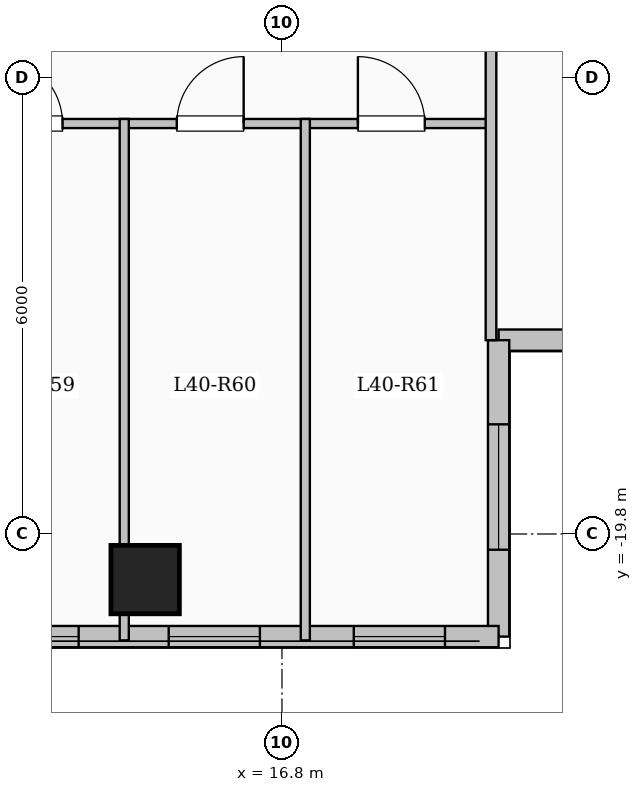
"""IFC4 building model, lengths in metres.
Left out: names, types, materials, properties, quantities, classifications, styles, units other than length and angle.
Written with IfcOpenShell. Run it as: python <this file> out.ifc"""

import sys

from ifc_helpers import new_model, si_unit, direction, frame, frame_2d, origin, origin_2d, place, context, subcontext, project, spatial, rectangle, extrude, element, fill, save


model = new_model("IFC4")
c1 = context("Model", 3, precision=1e-05, world=origin(), true_north=direction((0.0, 1.0)))
c2 = subcontext(c1, "Body", "Model", "MODEL_VIEW")
j1 = project(units=[si_unit("LENGTHUNIT", "METRE"), si_unit("PLANEANGLEUNIT", "RADIAN")], contexts=[c1])
p1 = place(None, origin())
s1 = spatial("IfcSite", under=j1, at=p1, CompositionType="ELEMENT")
p2 = place(p1, origin())
s2 = spatial("IfcBuilding", under=s1, at=p2, CompositionType="ELEMENT")
p3 = place(p2, frame((0.0, 0.0, 149.35)))
s3 = spatial("IfcBuildingStorey", under=s2, at=p3, CompositionType="ELEMENT", Elevation=149.35)
p4 = place(p3, frame((15.0, -20.4, 0.0), z_axis=(0.0, 0.0, 1.0), x_axis=(1.0, 0.0, 0.0)))
e1 = element("IfcColumn", 1, at=p4, inside=s3, PredefinedType="COLUMN", context=c2, shape_type="SweptSolid", body=[
    extrude(rectangle(XDim=0.9, YDim=0.9, at=origin_2d()), origin(), (0.0, 0.0, 1.0), 3.35),
])
p5 = place(p3, frame((25.05, -17.25, 0.0), z_axis=(0.0, 0.0, 1.0), x_axis=(-1.0, 0.0, 0.0)))
e2 = element("IfcWall", 2, at=p5, inside=s3, PredefinedType="SOLIDWALL", context=c2, shape_type="SweptSolid", body=[
    extrude(rectangle(XDim=5.4, YDim=0.28, at=frame_2d((2.7, 0.0))), origin(), (0.0, 0.0, 1.0), 3.1),
])
p6 = place(p5, frame((1.625, 0.0, 0.9)))
e3 = element("IfcOpeningElement", 3, at=p6, cuts=e2, PredefinedType="OPENING", context=c2, shape_type="SweptSolid", body=[
    extrude(rectangle(XDim=2.2, YDim=1.75, at=frame_2d((1.1, 0.875))), frame((0.0, 0.15, 0.0), z_axis=(0.0, -1.0, 0.0), x_axis=(1.0, 0.0, 0.0)), (0.0, 0.0, 1.0), 0.3),
])
p7 = place(p3, frame((19.65, -17.25, 0.0), z_axis=(0.0, 0.0, 1.0), x_axis=(0.0, -1.0, 0.0)))
e4 = element("IfcWall", 4, at=p7, inside=s3, PredefinedType="SOLIDWALL", context=c2, shape_type="SweptSolid", body=[
    extrude(rectangle(XDim=3.9, YDim=0.28, at=frame_2d((1.95, 0.0))), origin(), (0.0, 0.0, 1.0), 3.1),
])
p8 = place(p7, frame((1.107, 0.0, 0.9)))
e5 = element("IfcOpeningElement", 5, at=p8, cuts=e4, PredefinedType="OPENING", context=c2, shape_type="SweptSolid", body=[
    extrude(rectangle(XDim=1.65, YDim=1.6, at=frame_2d((0.825, 0.8))), frame((0.0, 0.15, 0.0), z_axis=(0.0, -1.0, 0.0), x_axis=(1.0, 0.0, 0.0)), (0.0, 0.0, 1.0), 0.3),
])
p9 = place(p3, frame((19.65, -21.15, 0.0), z_axis=(0.0, 0.0, 1.0), x_axis=(-1.0, 0.0, 0.0)))
e6 = element("IfcWall", 6, at=p9, inside=s3, PredefinedType="SOLIDWALL", context=c2, shape_type="SweptSolid", body=[
    extrude(rectangle(XDim=12.3, YDim=0.28, at=frame_2d((6.15, 0.0))), origin(), (0.0, 0.0, 1.0), 3.1),
])
p10 = place(p9, frame((0.705, 0.0, 0.95)))
e7 = element("IfcOpeningElement", 7, at=p10, cuts=e6, PredefinedType="OPENING", context=c2, shape_type="SweptSolid", body=[
    extrude(rectangle(XDim=1.2, YDim=1.5, at=frame_2d((0.6, 0.75))), frame((0.0, 0.15, 0.0), z_axis=(0.0, -1.0, 0.0), x_axis=(1.0, 0.0, 0.0)), (0.0, 0.0, 1.0), 0.3),
])
p11 = place(p9, frame((3.14, 0.0, 0.95)))
e8 = element("IfcOpeningElement", 8, at=p11, cuts=e6, PredefinedType="OPENING", context=c2, shape_type="SweptSolid", body=[
    extrude(rectangle(XDim=1.2, YDim=1.5, at=frame_2d((0.6, 0.75))), frame((0.0, 0.15, 0.0), z_axis=(0.0, -1.0, 0.0), x_axis=(1.0, 0.0, 0.0)), (0.0, 0.0, 1.0), 0.3),
])
p12 = place(p9, frame((5.525, 0.0, 0.95)))
e9 = element("IfcOpeningElement", 9, at=p12, cuts=e6, PredefinedType="OPENING", context=c2, shape_type="SweptSolid", body=[
    extrude(rectangle(XDim=1.2, YDim=1.5, at=frame_2d((0.6, 0.75))), frame((0.0, 0.15, 0.0), z_axis=(0.0, -1.0, 0.0), x_axis=(1.0, 0.0, 0.0)), (0.0, 0.0, 1.0), 0.3),
])
p13 = place(p9, frame((8.362, 0.0, 0.9)))
e10 = element("IfcOpeningElement", 10, at=p13, cuts=e6, PredefinedType="OPENING", context=c2, shape_type="SweptSolid", body=[
    extrude(rectangle(XDim=1.65, YDim=1.6, at=frame_2d((0.825, 0.8))), frame((0.0, 0.15, 0.0), z_axis=(0.0, -1.0, 0.0), x_axis=(1.0, 0.0, 0.0)), (0.0, 0.0, 1.0), 0.3),
])
p14 = place(p9, frame((11.303, 0.0, 0.95)))
e11 = element("IfcOpeningElement", 11, at=p14, cuts=e6, PredefinedType="OPENING", context=c2, shape_type="SweptSolid", body=[
    extrude(rectangle(XDim=0.85, YDim=1.5, at=frame_2d((0.425, 0.75))), frame((0.0, 0.15, 0.0), z_axis=(0.0, -1.0, 0.0), x_axis=(1.0, 0.0, 0.0)), (0.0, 0.0, 1.0), 0.3),
])
p15 = place(p3, frame((12.282, -14.4, 0.0), z_axis=(0.0, 0.0, 1.0), x_axis=(1.0, 0.0, 0.0)))
e12 = element("IfcWall", 12, at=p15, inside=s3, PredefinedType="PARTITIONING", context=c2, shape_type="SweptSolid", body=[
    extrude(rectangle(XDim=7.328, YDim=0.12, at=frame_2d((3.664, 0.0))), origin(), (0.0, 0.0, 1.0), 3.1),
])
p16 = place(p15, frame((0.751, 0.0, 0.0)))
e13 = element("IfcOpeningElement", 13, at=p16, cuts=e12, PredefinedType="OPENING", context=c2, shape_type="SweptSolid", body=[
    extrude(rectangle(XDim=0.88, YDim=2.1, at=frame_2d((0.44, 1.05))), frame((0.0, 0.07, 0.0), z_axis=(0.0, -1.0, 0.0), x_axis=(1.0, 0.0, 0.0)), (0.0, 0.0, 1.0), 0.14),
])
p17 = place(p15, frame((3.134, 0.0, 0.0)))
e14 = element("IfcOpeningElement", 14, at=p17, cuts=e12, PredefinedType="OPENING", context=c2, shape_type="SweptSolid", body=[
    extrude(rectangle(XDim=0.88, YDim=2.1, at=frame_2d((0.44, 1.05))), frame((0.0, 0.07, 0.0), z_axis=(0.0, -1.0, 0.0), x_axis=(1.0, 0.0, 0.0)), (0.0, 0.0, 1.0), 0.14),
])
p18 = place(p15, frame((5.517, 0.0, 0.0)))
e15 = element("IfcOpeningElement", 15, at=p18, cuts=e12, PredefinedType="OPENING", context=c2, shape_type="SweptSolid", body=[
    extrude(rectangle(XDim=0.88, YDim=2.1, at=frame_2d((0.44, 1.05))), frame((0.0, 0.07, 0.0), z_axis=(0.0, -1.0, 0.0), x_axis=(1.0, 0.0, 0.0)), (0.0, 0.0, 1.0), 0.14),
])
p19 = place(p3, frame((14.725, -21.2, 0.0), z_axis=(0.0, 0.0, 1.0), x_axis=(0.0, 1.0, 0.0)))
e16 = element("IfcWall", 16, at=p19, inside=s3, PredefinedType="PARTITIONING", context=c2, shape_type="SweptSolid", body=[
    extrude(rectangle(XDim=6.86, YDim=0.12, at=frame_2d((3.43, 0.0))), origin(), (0.0, 0.0, 1.0), 2.585),
])
p20 = place(p3, frame((17.107, -21.2, 0.0), z_axis=(0.0, 0.0, 1.0), x_axis=(0.0, 1.0, 0.0)))
e17 = element("IfcWall", 17, at=p20, inside=s3, PredefinedType="PARTITIONING", context=c2, shape_type="SweptSolid", body=[
    extrude(rectangle(XDim=6.86, YDim=0.12, at=frame_2d((3.43, 0.0))), origin(), (0.0, 0.0, 1.0), 3.1),
])
p21 = place(p3, frame((19.55, -17.25, 0.0), z_axis=(0.0, 0.0, 1.0), x_axis=(0.0, 1.0, 0.0)))
e18 = element("IfcWall", 18, at=p21, inside=s3, PredefinedType="PARTITIONING", context=c2, shape_type="SweptSolid", body=[
    extrude(rectangle(XDim=6.9, YDim=0.14, at=frame_2d((3.45, 0.0))), origin(), (0.0, 0.0, 1.0), 3.1),
])
p22 = place(p8, origin())
e19 = element("IfcWindow", 19, at=p22, inside=s3, PartitioningType="SINGLE_PANEL", PredefinedType="WINDOW", context=c2, shape_type="SweptSolid", body=[
    extrude(rectangle(XDim=1.65, YDim=1.6, at=frame_2d((0.825, 0.8))), frame((0.0, 0.03, 0.0), z_axis=(0.0, -1.0, 0.0), x_axis=(1.0, 0.0, 0.0)), (0.0, 0.0, 1.0), 0.06),
])
fill(e5, e19)
p23 = place(p10, origin())
e20 = element("IfcWindow", 20, at=p23, inside=s3, PartitioningType="SINGLE_PANEL", PredefinedType="WINDOW", context=c2, shape_type="SweptSolid", body=[
    extrude(rectangle(XDim=1.2, YDim=1.5, at=frame_2d((0.6, 0.75))), frame((0.0, 0.03, 0.0), z_axis=(0.0, -1.0, 0.0), x_axis=(1.0, 0.0, 0.0)), (0.0, 0.0, 1.0), 0.06),
])
fill(e7, e20)
p24 = place(p11, origin())
e21 = element("IfcWindow", 21, at=p24, inside=s3, PartitioningType="SINGLE_PANEL", PredefinedType="WINDOW", context=c2, shape_type="SweptSolid", body=[
    extrude(rectangle(XDim=1.2, YDim=1.5, at=frame_2d((0.6, 0.75))), frame((0.0, 0.03, 0.0), z_axis=(0.0, -1.0, 0.0), x_axis=(1.0, 0.0, 0.0)), (0.0, 0.0, 1.0), 0.06),
])
fill(e8, e21)
p25 = place(p12, origin())
e22 = element("IfcWindow", 22, at=p25, inside=s3, PartitioningType="SINGLE_PANEL", PredefinedType="WINDOW", context=c2, shape_type="SweptSolid", body=[
    extrude(rectangle(XDim=1.2, YDim=1.5, at=frame_2d((0.6, 0.75))), frame((0.0, 0.03, 0.0), z_axis=(0.0, -1.0, 0.0), x_axis=(1.0, 0.0, 0.0)), (0.0, 0.0, 1.0), 0.06),
])
fill(e9, e22)
p26 = place(p16, origin())
e23 = element("IfcDoor", 23, at=p26, inside=s3, OperationType="SINGLE_SWING_LEFT", PredefinedType="DOOR", context=c2, shape_type="SweptSolid", body=[
    extrude(rectangle(XDim=0.88, YDim=2.1, at=frame_2d((0.44, 1.05))), frame((0.0, 0.025, 0.0), z_axis=(0.0, -1.0, 0.0), x_axis=(1.0, 0.0, 0.0)), (0.0, 0.0, 1.0), 0.05),
])
fill(e13, e23)
p27 = place(p17, origin())
e24 = element("IfcDoor", 24, at=p27, inside=s3, OperationType="SINGLE_SWING_RIGHT", PredefinedType="DOOR", context=c2, shape_type="SweptSolid", body=[
    extrude(rectangle(XDim=0.88, YDim=2.1, at=frame_2d((0.44, 1.05))), frame((0.0, 0.025, 0.0), z_axis=(0.0, -1.0, 0.0), x_axis=(1.0, 0.0, 0.0)), (0.0, 0.0, 1.0), 0.05),
])
fill(e14, e24)
p28 = place(p18, origin())
e25 = element("IfcDoor", 25, at=p28, inside=s3, OperationType="SINGLE_SWING_LEFT", PredefinedType="DOOR", context=c2, shape_type="SweptSolid", body=[
    extrude(rectangle(XDim=0.88, YDim=2.1, at=frame_2d((0.44, 1.05))), frame((0.0, 0.025, 0.0), z_axis=(0.0, -1.0, 0.0), x_axis=(1.0, 0.0, 0.0)), (0.0, 0.0, 1.0), 0.05),
])
fill(e15, e25)
save(model, sys.argv[1])
